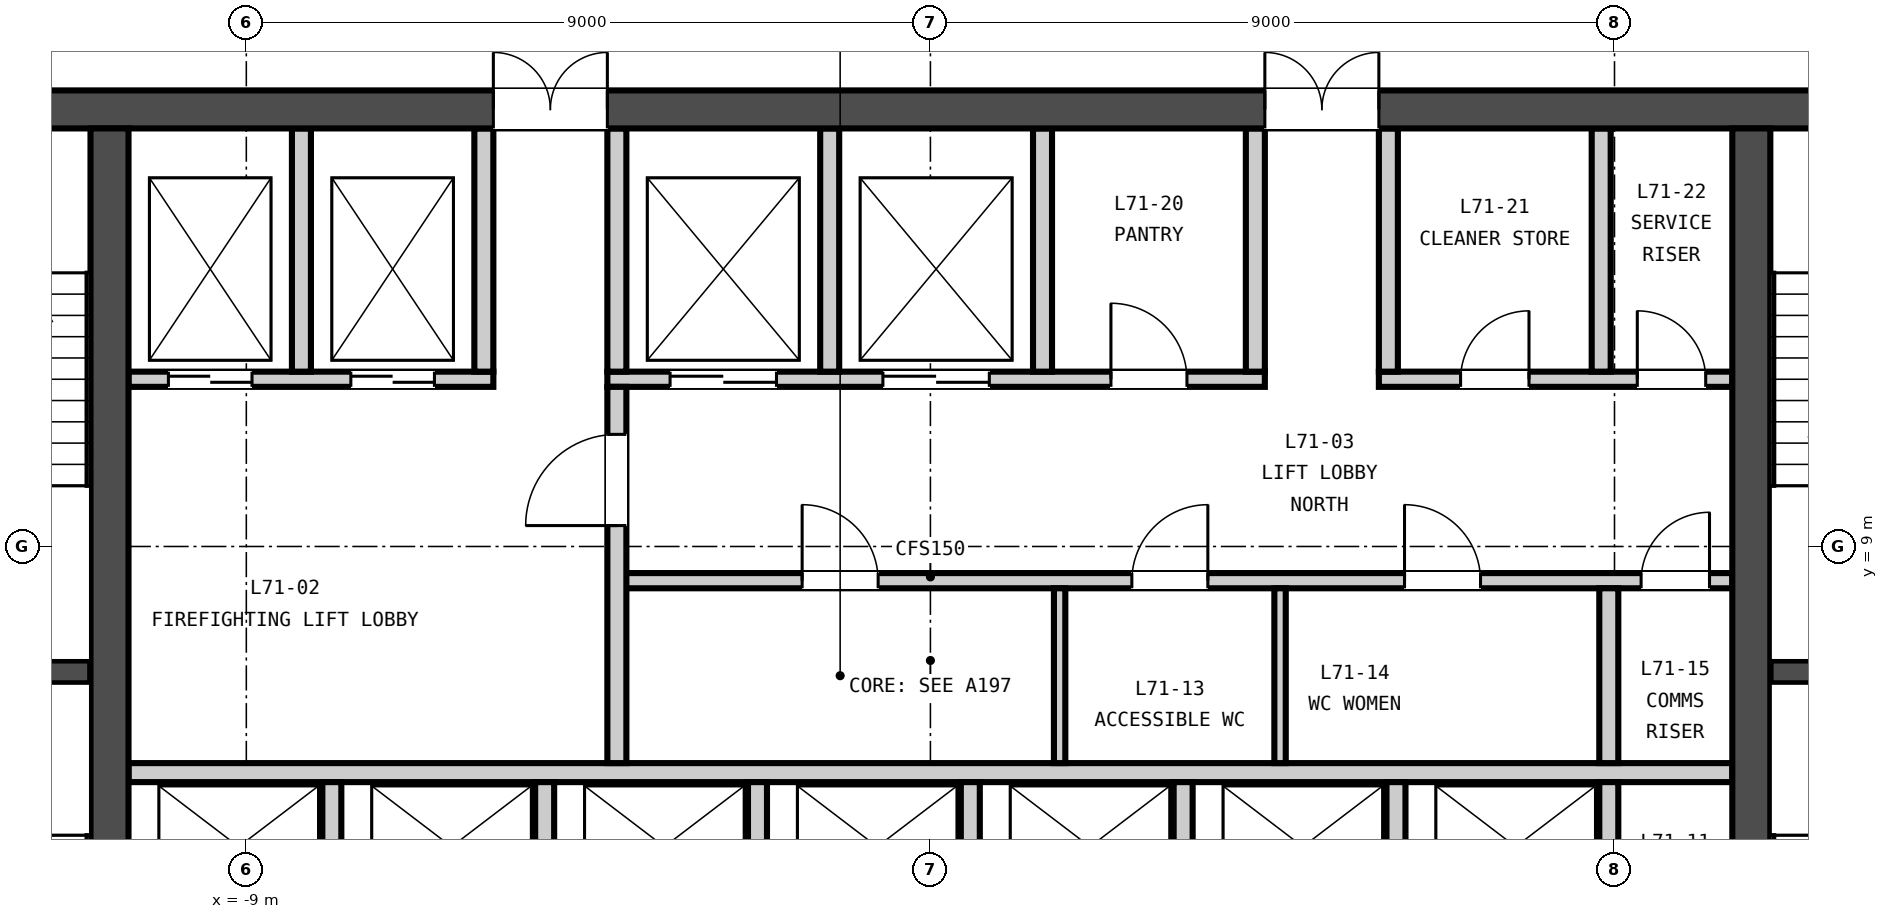
"""IFC4 building model, lengths in metres.
Left out: names, types, materials, properties, quantities, classifications, styles, units other than length and angle.
Written with IfcOpenShell. Run it as: python <this file> out.ifc"""

import sys

from ifc_helpers import new_model, si_unit, direction, frame, frame_2d, origin, place, context, subcontext, project, spatial, rectangle, extrude, element, fill, save


model = new_model("IFC4")
c1 = context("Model", 3, precision=1e-05, world=origin(), true_north=direction((0.0, 1.0)))
c2 = subcontext(c1, "Body", "Model", "MODEL_VIEW")
j1 = project(units=[si_unit("LENGTHUNIT", "METRE"), si_unit("PLANEANGLEUNIT", "RADIAN")], contexts=[c1])
p1 = place(None, origin())
s1 = spatial("IfcSite", under=j1, at=p1, CompositionType="ELEMENT")
p2 = place(p1, origin())
s2 = spatial("IfcBuilding", under=s1, at=p2, CompositionType="ELEMENT")
p3 = place(p2, frame((0.0, 0.0, 279.2)))
s3 = spatial("IfcBuildingStorey", under=s2, at=p3, CompositionType="ELEMENT", Elevation=279.2)
p4 = place(p3, frame((-15.0, 14.75, -0.15), z_axis=(0.0, 0.0, 1.0), x_axis=(1.0, 0.0, 0.0)))
e1 = element("IfcWall", 1, at=p4, inside=s3, PredefinedType="SOLIDWALL", context=c2, shape_type="SweptSolid", body=[
    extrude(rectangle(XDim=30.0, YDim=0.5, at=frame_2d((15.0, 0.0))), origin(), (0.0, 0.0, 1.0), 3.65),
])
p5 = place(p4, frame((9.25, 0.0, 0.15)))
e2 = element("IfcOpeningElement", 2, at=p5, cuts=e1, PredefinedType="OPENING", context=c2, shape_type="SweptSolid", body=[
    extrude(rectangle(XDim=1.5, YDim=2.1, at=frame_2d((0.75, 1.05))), frame((0.0, 0.26, 0.0), z_axis=(0.0, -1.0, 0.0), x_axis=(1.0, 0.0, 0.0)), (0.0, 0.0, 1.0), 0.52),
])
p6 = place(p4, frame((19.4, 0.0, 0.15)))
e3 = element("IfcOpeningElement", 3, at=p6, cuts=e1, PredefinedType="OPENING", context=c2, shape_type="SweptSolid", body=[
    extrude(rectangle(XDim=1.5, YDim=2.1, at=frame_2d((0.75, 1.05))), frame((0.0, 0.26, 0.0), z_axis=(0.0, -1.0, 0.0), x_axis=(1.0, 0.0, 0.0)), (0.0, 0.0, 1.0), 0.52),
])
p7 = place(p4, frame((1.5, 0.0, 0.15)))
e4 = element("IfcOpeningElement", 4, at=p7, cuts=e1, PredefinedType="OPENING", context=c2, shape_type="SweptSolid", body=[
    extrude(rectangle(XDim=1.2, YDim=2.1, at=frame_2d((0.6, 1.05))), frame((0.0, 0.26, 0.0), z_axis=(0.0, -1.0, 0.0), x_axis=(1.0, 0.0, 0.0)), (0.0, 0.0, 1.0), 0.52),
])
p8 = place(p4, frame((27.3, 0.0, 0.15)))
e5 = element("IfcOpeningElement", 5, at=p8, cuts=e1, PredefinedType="OPENING", context=c2, shape_type="SweptSolid", body=[
    extrude(rectangle(XDim=1.2, YDim=2.1, at=frame_2d((0.6, 1.05))), frame((0.0, 0.26, 0.0), z_axis=(0.0, -1.0, 0.0), x_axis=(1.0, 0.0, 0.0)), (0.0, 0.0, 1.0), 0.52),
])
for number, where, z_axis, x_axis in (
    (6, (-10.8, 0.5, -0.15), (0.0, 0.0, 1.0), (0.0, 1.0, 0.0)),
    (7, (10.8, 0.5, -0.15), (0.0, 0.0, 1.0), (0.0, 1.0, 0.0)),
):
    element("IfcWall", number, at=place(p3, frame(where, z_axis=z_axis, x_axis=x_axis)), inside=s3, PredefinedType="SOLIDWALL", context=c2, shape_type="SweptSolid", body=[
        extrude(rectangle(XDim=14.0, YDim=0.5, at=frame_2d((7.0, 0.0))), origin(), (0.0, 0.0, 1.0), 3.65),
    ])
p9 = place(p3, frame((-10.55, 6.025, 0.0), z_axis=(0.0, 0.0, 1.0), x_axis=(1.0, 0.0, 0.0)))
e8 = element("IfcWall", 8, at=p9, inside=s3, PredefinedType="PARTITIONING", context=c2, shape_type="SweptSolid", body=[
    extrude(rectangle(XDim=21.1, YDim=0.25, at=frame_2d((10.55, 0.0))), origin(), (0.0, 0.0, 1.0), 3.5),
])
p10 = place(p3, frame((-4.125, 8.55, 0.0), z_axis=(0.0, 0.0, 1.0), x_axis=(1.0, 0.0, 0.0)))
e9 = element("IfcWall", 9, at=p10, inside=s3, PredefinedType="PARTITIONING", context=c2, shape_type="SweptSolid", body=[
    extrude(rectangle(XDim=14.675, YDim=0.2, at=frame_2d((7.337, 0.0))), origin(), (0.0, 0.0, 1.0), 3.5),
])
p11 = place(p10, frame((2.438, 0.0, 0.0)))
e10 = element("IfcOpeningElement", 10, at=p11, cuts=e9, PredefinedType="OPENING", context=c2, shape_type="SweptSolid", body=[
    extrude(rectangle(XDim=1.0, YDim=2.1, at=frame_2d((0.5, 1.05))), frame((0.0, 0.11, 0.0), z_axis=(0.0, -1.0, 0.0), x_axis=(1.0, 0.0, 0.0)), (0.0, 0.0, 1.0), 0.22),
])
p12 = place(p10, frame((6.775, 0.0, 0.0)))
e11 = element("IfcOpeningElement", 11, at=p12, cuts=e9, PredefinedType="OPENING", context=c2, shape_type="SweptSolid", body=[
    extrude(rectangle(XDim=1.0, YDim=2.1, at=frame_2d((0.5, 1.05))), frame((0.0, 0.11, 0.0), z_axis=(0.0, -1.0, 0.0), x_axis=(1.0, 0.0, 0.0)), (0.0, 0.0, 1.0), 0.22),
])
p13 = place(p10, frame((10.363, 0.0, 0.0)))
e12 = element("IfcOpeningElement", 12, at=p13, cuts=e9, PredefinedType="OPENING", context=c2, shape_type="SweptSolid", body=[
    extrude(rectangle(XDim=1.0, YDim=2.1, at=frame_2d((0.5, 1.05))), frame((0.0, 0.11, 0.0), z_axis=(0.0, -1.0, 0.0), x_axis=(1.0, 0.0, 0.0)), (0.0, 0.0, 1.0), 0.22),
])
p14 = place(p10, frame((13.475, 0.0, 0.0)))
e13 = element("IfcOpeningElement", 13, at=p14, cuts=e9, PredefinedType="OPENING", context=c2, shape_type="SweptSolid", body=[
    extrude(rectangle(XDim=0.9, YDim=2.1, at=frame_2d((0.45, 1.05))), frame((0.0, 0.11, 0.0), z_axis=(0.0, -1.0, 0.0), x_axis=(1.0, 0.0, 0.0)), (0.0, 0.0, 1.0), 0.22),
])
p15 = place(p3, frame((-10.55, 11.2, 0.0), z_axis=(0.0, 0.0, 1.0), x_axis=(1.0, 0.0, 0.0)))
e14 = element("IfcWall", 14, at=p15, inside=s3, PredefinedType="PARTITIONING", context=c2, shape_type="SweptSolid", body=[
    extrude(rectangle(XDim=4.8, YDim=0.2, at=frame_2d((2.4, 0.0))), origin(), (0.0, 0.0, 1.0), 3.5),
])
p16 = place(p15, frame((0.525, 0.0, 0.0)))
e15 = element("IfcOpeningElement", 15, at=p16, cuts=e14, PredefinedType="OPENING", context=c2, shape_type="SweptSolid", body=[
    extrude(rectangle(XDim=1.1, YDim=2.1, at=frame_2d((0.55, 1.05))), frame((0.0, 0.11, 0.0), z_axis=(0.0, -1.0, 0.0), x_axis=(1.0, 0.0, 0.0)), (0.0, 0.0, 1.0), 0.22),
])
p17 = place(p15, frame((2.925, 0.0, 0.0)))
e16 = element("IfcOpeningElement", 16, at=p17, cuts=e14, PredefinedType="OPENING", context=c2, shape_type="SweptSolid", body=[
    extrude(rectangle(XDim=1.1, YDim=2.1, at=frame_2d((0.55, 1.05))), frame((0.0, 0.11, 0.0), z_axis=(0.0, -1.0, 0.0), x_axis=(1.0, 0.0, 0.0)), (0.0, 0.0, 1.0), 0.22),
])
p18 = place(p3, frame((-4.25, 11.2, 0.0), z_axis=(0.0, 0.0, 1.0), x_axis=(1.0, 0.0, 0.0)))
e17 = element("IfcWall", 17, at=p18, inside=s3, PredefinedType="PARTITIONING", context=c2, shape_type="SweptSolid", body=[
    extrude(rectangle(XDim=8.65, YDim=0.2, at=frame_2d((4.325, 0.0))), origin(), (0.0, 0.0, 1.0), 3.5),
])
p19 = place(p18, frame((0.825, 0.0, 0.0)))
e18 = element("IfcOpeningElement", 18, at=p19, cuts=e17, PredefinedType="OPENING", context=c2, shape_type="SweptSolid", body=[
    extrude(rectangle(XDim=1.4, YDim=2.1, at=frame_2d((0.7, 1.05))), frame((0.0, 0.11, 0.0), z_axis=(0.0, -1.0, 0.0), x_axis=(1.0, 0.0, 0.0)), (0.0, 0.0, 1.0), 0.22),
])
p20 = place(p18, frame((3.625, 0.0, 0.0)))
e19 = element("IfcOpeningElement", 19, at=p20, cuts=e17, PredefinedType="OPENING", context=c2, shape_type="SweptSolid", body=[
    extrude(rectangle(XDim=1.4, YDim=2.1, at=frame_2d((0.7, 1.05))), frame((0.0, 0.11, 0.0), z_axis=(0.0, -1.0, 0.0), x_axis=(1.0, 0.0, 0.0)), (0.0, 0.0, 1.0), 0.22),
])
p21 = place(p18, frame((6.625, 0.0, 0.0)))
e20 = element("IfcOpeningElement", 20, at=p21, cuts=e17, PredefinedType="OPENING", context=c2, shape_type="SweptSolid", body=[
    extrude(rectangle(XDim=1.0, YDim=2.1, at=frame_2d((0.5, 1.05))), frame((0.0, 0.11, 0.0), z_axis=(0.0, -1.0, 0.0), x_axis=(1.0, 0.0, 0.0)), (0.0, 0.0, 1.0), 0.22),
])
p22 = place(p3, frame((5.9, 11.2, 0.0), z_axis=(0.0, 0.0, 1.0), x_axis=(1.0, 0.0, 0.0)))
e21 = element("IfcWall", 21, at=p22, inside=s3, PredefinedType="PARTITIONING", context=c2, shape_type="SweptSolid", body=[
    extrude(rectangle(XDim=4.65, YDim=0.2, at=frame_2d((2.325, 0.0))), origin(), (0.0, 0.0, 1.0), 3.5),
])
p23 = place(p22, frame((1.075, 0.0, 0.0)))
e22 = element("IfcOpeningElement", 22, at=p23, cuts=e21, PredefinedType="OPENING", context=c2, shape_type="SweptSolid", body=[
    extrude(rectangle(XDim=0.9, YDim=2.1, at=frame_2d((0.45, 1.05))), frame((0.0, 0.11, 0.0), z_axis=(0.0, -1.0, 0.0), x_axis=(1.0, 0.0, 0.0)), (0.0, 0.0, 1.0), 0.22),
])
p24 = place(p22, frame((3.4, 0.0, 0.0)))
e23 = element("IfcOpeningElement", 23, at=p24, cuts=e21, PredefinedType="OPENING", context=c2, shape_type="SweptSolid", body=[
    extrude(rectangle(XDim=0.9, YDim=2.1, at=frame_2d((0.45, 1.05))), frame((0.0, 0.11, 0.0), z_axis=(0.0, -1.0, 0.0), x_axis=(1.0, 0.0, 0.0)), (0.0, 0.0, 1.0), 0.22),
])
p25 = place(p3, frame((-4.125, 6.15, 0.0), z_axis=(0.0, 0.0, 1.0), x_axis=(0.0, 1.0, 0.0)))
e24 = element("IfcWall", 24, at=p25, inside=s3, PredefinedType="PARTITIONING", context=c2, shape_type="SweptSolid", body=[
    extrude(rectangle(XDim=4.95, YDim=0.25, at=frame_2d((2.475, 0.0))), origin(), (0.0, 0.0, 1.0), 3.5),
])
p26 = place(p25, frame((3.125, 0.0, 0.0)))
e25 = element("IfcOpeningElement", 25, at=p26, cuts=e24, PredefinedType="OPENING", context=c2, shape_type="SweptSolid", body=[
    extrude(rectangle(XDim=1.2, YDim=2.1, at=frame_2d((0.6, 1.05))), frame((0.0, 0.135, 0.0), z_axis=(0.0, -1.0, 0.0), x_axis=(1.0, 0.0, 0.0)), (0.0, 0.0, 1.0), 0.27),
])
for number, where, z_axis, x_axis in (
    (26, (-7.875, 3.6, 0.0), (0.0, 0.0, 1.0), (0.0, 1.0, 0.0)),
    (27, (-5.075, 3.6, 0.0), (0.0, 0.0, 1.0), (0.0, 1.0, 0.0)),
    (28, (-2.275, 3.6, 0.0), (0.0, 0.0, 1.0), (0.0, 1.0, 0.0)),
    (29, (0.525, 3.6, 0.0), (0.0, 0.0, 1.0), (0.0, 1.0, 0.0)),
    (30, (3.325, 3.6, 0.0), (0.0, 0.0, 1.0), (0.0, 1.0, 0.0)),
    (31, (6.125, 3.6, 0.0), (0.0, 0.0, 1.0), (0.0, 1.0, 0.0)),
    (32, (8.925, 3.6, 0.0), (0.0, 0.0, 1.0), (0.0, 1.0, 0.0)),
):
    element("IfcWall", number, at=place(p3, frame(where, z_axis=z_axis, x_axis=x_axis)), inside=s3, PredefinedType="PARTITIONING", context=c2, shape_type="SweptSolid", body=[
        extrude(rectangle(XDim=2.3, YDim=0.25, at=frame_2d((1.15, 0.0))), origin(), (0.0, 0.0, 1.0), 3.5),
    ])
for number, where, z_axis, x_axis in (
    (33, (1.7, 6.15, 0.0), (0.0, 0.0, 1.0), (0.0, 1.0, 0.0)),
    (34, (4.6, 6.15, 0.0), (0.0, 0.0, 1.0), (0.0, 1.0, 0.0)),
):
    element("IfcWall", number, at=place(p3, frame(where, z_axis=z_axis, x_axis=x_axis)), inside=s3, PredefinedType="PARTITIONING", context=c2, shape_type="SweptSolid", body=[
        extrude(rectangle(XDim=2.3, YDim=0.15, at=frame_2d((1.15, 0.0))), origin(), (0.0, 0.0, 1.0), 3.5),
    ])
p27 = place(p3, frame((8.925, 6.15, 0.0), z_axis=(0.0, 0.0, 1.0), x_axis=(0.0, 1.0, 0.0)))
e35 = element("IfcWall", 35, at=p27, inside=s3, PredefinedType="PARTITIONING", context=c2, shape_type="SweptSolid", body=[
    extrude(rectangle(XDim=2.3, YDim=0.25, at=frame_2d((1.15, 0.0))), origin(), (0.0, 0.0, 1.0), 3.5),
])
for number, where, z_axis, x_axis in (
    (36, (-8.275, 11.3, 0.0), (0.0, 0.0, 1.0), (0.0, 1.0, 0.0)),
    (37, (-5.875, 11.3, 0.0), (0.0, 0.0, 1.0), (0.0, 1.0, 0.0)),
    (38, (-4.125, 11.3, 0.0), (0.0, 0.0, 1.0), (0.0, 1.0, 0.0)),
    (39, (-1.325, 11.3, 0.0), (0.0, 0.0, 1.0), (0.0, 1.0, 0.0)),
    (40, (1.475, 11.3, 0.0), (0.0, 0.0, 1.0), (0.0, 1.0, 0.0)),
    (41, (4.275, 11.3, 0.0), (0.0, 0.0, 1.0), (0.0, 1.0, 0.0)),
    (42, (6.025, 11.3, 0.0), (0.0, 0.0, 1.0), (0.0, 1.0, 0.0)),
    (43, (8.825, 11.3, 0.0), (0.0, 0.0, 1.0), (0.0, 1.0, 0.0)),
):
    element("IfcWall", number, at=place(p3, frame(where, z_axis=z_axis, x_axis=x_axis)), inside=s3, PredefinedType="PARTITIONING", context=c2, shape_type="SweptSolid", body=[
        extrude(rectangle(XDim=3.2, YDim=0.25, at=frame_2d((1.6, 0.0))), origin(), (0.0, 0.0, 1.0), 3.5),
    ])
for number, where, z_axis, x_axis in (
    (44, (-14.0, 7.35, 0.0), (0.0, 0.0, 1.0), (1.0, 0.0, 0.0)),
    (45, (11.05, 7.35, 0.0), (0.0, 0.0, 1.0), (1.0, 0.0, 0.0)),
):
    element("IfcWall", number, at=place(p3, frame(where, z_axis=z_axis, x_axis=x_axis)), inside=s3, PredefinedType="SOLIDWALL", context=c2, shape_type="SweptSolid", body=[
        extrude(rectangle(XDim=2.95, YDim=0.3, at=frame_2d((1.475, 0.0))), origin(), (0.0, 0.0, 1.0), 3.5),
    ])
p28 = place(p26, origin())
e46 = element("IfcDoor", 46, at=p28, inside=s3, OperationType="SINGLE_SWING_LEFT", PredefinedType="DOOR", context=c2, shape_type="SweptSolid", body=[
    extrude(rectangle(XDim=1.2, YDim=2.1, at=frame_2d((0.6, 1.05))), frame((0.0, 0.025, 0.0), z_axis=(0.0, -1.0, 0.0), x_axis=(1.0, 0.0, 0.0)), (0.0, 0.0, 1.0), 0.05),
])
fill(e25, e46)
p29 = place(p11, origin())
e47 = element("IfcDoor", 47, at=p29, inside=s3, OperationType="SINGLE_SWING_LEFT", PredefinedType="DOOR", context=c2, shape_type="SweptSolid", body=[
    extrude(rectangle(XDim=1.0, YDim=2.1, at=frame_2d((0.5, 1.05))), frame((0.0, 0.025, 0.0), z_axis=(0.0, -1.0, 0.0), x_axis=(1.0, 0.0, 0.0)), (0.0, 0.0, 1.0), 0.05),
])
fill(e10, e47)
p30 = place(p12, origin())
e48 = element("IfcDoor", 48, at=p30, inside=s3, OperationType="SINGLE_SWING_RIGHT", PredefinedType="DOOR", context=c2, shape_type="SweptSolid", body=[
    extrude(rectangle(XDim=1.0, YDim=2.1, at=frame_2d((0.5, 1.05))), frame((0.0, 0.025, 0.0), z_axis=(0.0, -1.0, 0.0), x_axis=(1.0, 0.0, 0.0)), (0.0, 0.0, 1.0), 0.05),
])
fill(e11, e48)
p31 = place(p13, origin())
e49 = element("IfcDoor", 49, at=p31, inside=s3, OperationType="SINGLE_SWING_LEFT", PredefinedType="DOOR", context=c2, shape_type="SweptSolid", body=[
    extrude(rectangle(XDim=1.0, YDim=2.1, at=frame_2d((0.5, 1.05))), frame((0.0, 0.025, 0.0), z_axis=(0.0, -1.0, 0.0), x_axis=(1.0, 0.0, 0.0)), (0.0, 0.0, 1.0), 0.05),
])
fill(e12, e49)
p32 = place(p14, origin())
e50 = element("IfcDoor", 50, at=p32, inside=s3, OperationType="SINGLE_SWING_RIGHT", PredefinedType="DOOR", context=c2, shape_type="SweptSolid", body=[
    extrude(rectangle(XDim=0.9, YDim=2.1, at=frame_2d((0.45, 1.05))), frame((0.0, 0.025, 0.0), z_axis=(0.0, -1.0, 0.0), x_axis=(1.0, 0.0, 0.0)), (0.0, 0.0, 1.0), 0.05),
])
fill(e13, e50)
p33 = place(p16, origin())
e51 = element("IfcDoor", 51, at=p33, inside=s3, OperationType="DOUBLE_DOOR_SLIDING", PredefinedType="DOOR", context=c2, shape_type="SweptSolid", body=[
    extrude(rectangle(XDim=1.1, YDim=2.1, at=frame_2d((0.55, 1.05))), frame((0.0, 0.025, 0.0), z_axis=(0.0, -1.0, 0.0), x_axis=(1.0, 0.0, 0.0)), (0.0, 0.0, 1.0), 0.05),
])
fill(e15, e51)
p34 = place(p17, origin())
e52 = element("IfcDoor", 52, at=p34, inside=s3, OperationType="DOUBLE_DOOR_SLIDING", PredefinedType="DOOR", context=c2, shape_type="SweptSolid", body=[
    extrude(rectangle(XDim=1.1, YDim=2.1, at=frame_2d((0.55, 1.05))), frame((0.0, 0.025, 0.0), z_axis=(0.0, -1.0, 0.0), x_axis=(1.0, 0.0, 0.0)), (0.0, 0.0, 1.0), 0.05),
])
fill(e16, e52)
p35 = place(p19, origin())
e53 = element("IfcDoor", 53, at=p35, inside=s3, OperationType="DOUBLE_DOOR_SLIDING", PredefinedType="DOOR", context=c2, shape_type="SweptSolid", body=[
    extrude(rectangle(XDim=1.4, YDim=2.1, at=frame_2d((0.7, 1.05))), frame((0.0, 0.025, 0.0), z_axis=(0.0, -1.0, 0.0), x_axis=(1.0, 0.0, 0.0)), (0.0, 0.0, 1.0), 0.05),
])
fill(e18, e53)
p36 = place(p20, origin())
e54 = element("IfcDoor", 54, at=p36, inside=s3, OperationType="DOUBLE_DOOR_SLIDING", PredefinedType="DOOR", context=c2, shape_type="SweptSolid", body=[
    extrude(rectangle(XDim=1.4, YDim=2.1, at=frame_2d((0.7, 1.05))), frame((0.0, 0.025, 0.0), z_axis=(0.0, -1.0, 0.0), x_axis=(1.0, 0.0, 0.0)), (0.0, 0.0, 1.0), 0.05),
])
fill(e19, e54)
p37 = place(p21, origin())
e55 = element("IfcDoor", 55, at=p37, inside=s3, OperationType="SINGLE_SWING_LEFT", PredefinedType="DOOR", context=c2, shape_type="SweptSolid", body=[
    extrude(rectangle(XDim=1.0, YDim=2.1, at=frame_2d((0.5, 1.05))), frame((0.0, 0.025, 0.0), z_axis=(0.0, -1.0, 0.0), x_axis=(1.0, 0.0, 0.0)), (0.0, 0.0, 1.0), 0.05),
])
fill(e20, e55)
p38 = place(p23, origin())
e56 = element("IfcDoor", 56, at=p38, inside=s3, OperationType="SINGLE_SWING_RIGHT", PredefinedType="DOOR", context=c2, shape_type="SweptSolid", body=[
    extrude(rectangle(XDim=0.9, YDim=2.1, at=frame_2d((0.45, 1.05))), frame((0.0, 0.025, 0.0), z_axis=(0.0, -1.0, 0.0), x_axis=(1.0, 0.0, 0.0)), (0.0, 0.0, 1.0), 0.05),
])
fill(e22, e56)
p39 = place(p24, origin())
e57 = element("IfcDoor", 57, at=p39, inside=s3, OperationType="SINGLE_SWING_LEFT", PredefinedType="DOOR", context=c2, shape_type="SweptSolid", body=[
    extrude(rectangle(XDim=0.9, YDim=2.1, at=frame_2d((0.45, 1.05))), frame((0.0, 0.025, 0.0), z_axis=(0.0, -1.0, 0.0), x_axis=(1.0, 0.0, 0.0)), (0.0, 0.0, 1.0), 0.05),
])
fill(e23, e57)
p40 = place(p5, origin())
e58 = element("IfcDoor", 58, at=p40, inside=s3, OperationType="DOUBLE_DOOR_SINGLE_SWING", PredefinedType="DOOR", context=c2, shape_type="SweptSolid", body=[
    extrude(rectangle(XDim=1.5, YDim=2.1, at=frame_2d((0.75, 1.05))), frame((0.0, 0.025, 0.0), z_axis=(0.0, -1.0, 0.0), x_axis=(1.0, 0.0, 0.0)), (0.0, 0.0, 1.0), 0.05),
])
fill(e2, e58)
p41 = place(p6, origin())
e59 = element("IfcDoor", 59, at=p41, inside=s3, OperationType="DOUBLE_DOOR_SINGLE_SWING", PredefinedType="DOOR", context=c2, shape_type="SweptSolid", body=[
    extrude(rectangle(XDim=1.5, YDim=2.1, at=frame_2d((0.75, 1.05))), frame((0.0, 0.025, 0.0), z_axis=(0.0, -1.0, 0.0), x_axis=(1.0, 0.0, 0.0)), (0.0, 0.0, 1.0), 0.05),
])
fill(e3, e59)
save(model, sys.argv[1])
